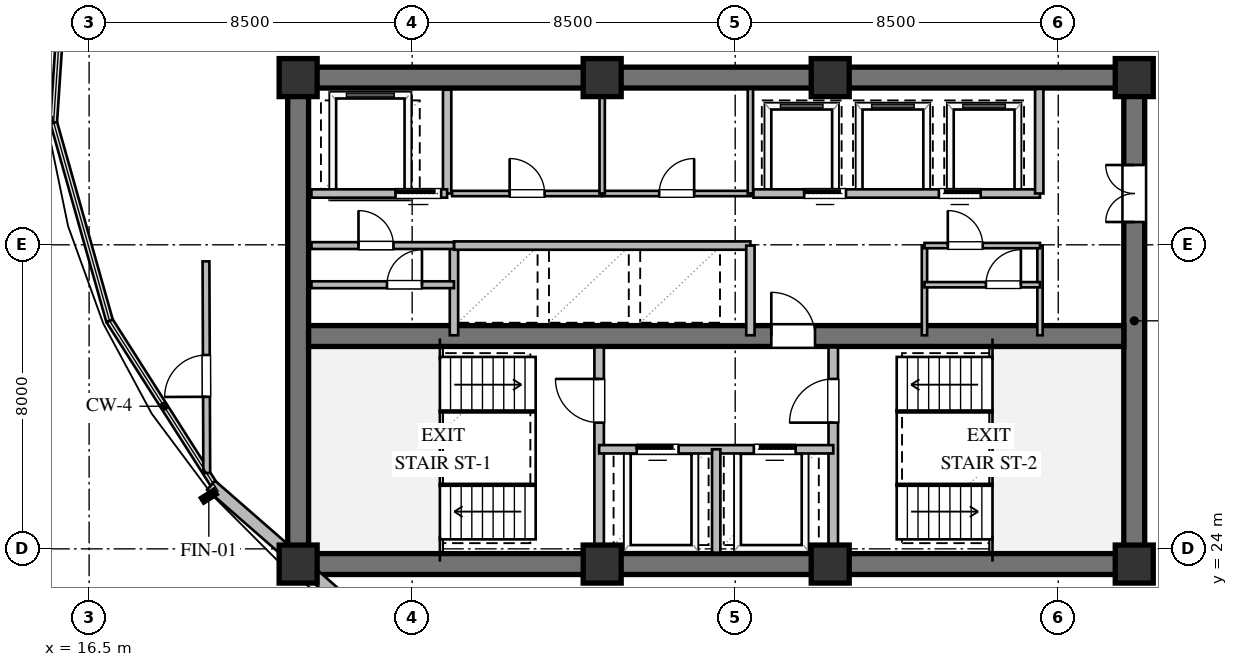
"""IFC4 building model, lengths in metres.
Left out: names, types, materials, properties, quantities, classifications, styles, units other than length and angle.
Written with IfcOpenShell. Run it as: python <this file> out.ifc"""

import sys

from ifc_helpers import new_model, si_unit, direction, frame, frame_2d, origin, origin_2d, place, context, subcontext, project, spatial, rectangle, extrude, element, fill, save


model = new_model("IFC4")
c1 = context("Model", 3, precision=1e-05, world=origin(), true_north=direction((0.0, 1.0)))
c2 = subcontext(c1, "Body", "Model", "MODEL_VIEW")
j1 = project(units=[si_unit("LENGTHUNIT", "METRE"), si_unit("PLANEANGLEUNIT", "RADIAN")], contexts=[c1])
p1 = place(None, origin())
s1 = spatial("IfcSite", under=j1, at=p1, CompositionType="ELEMENT")
p2 = place(p1, origin())
s2 = spatial("IfcBuilding", under=s1, at=p2, CompositionType="ELEMENT")
p3 = place(p2, frame((0.0, 0.0, 131.4)))
s3 = spatial("IfcBuildingStorey", under=s2, at=p3, CompositionType="ELEMENT", Elevation=131.4)
for number, where, z_axis, x_axis in (
    (1, (21.725, 23.6, 0.0), (0.0, 0.0, 1.0), (1.0, 0.0, 0.0)),
    (2, (21.725, 36.4, 0.0), (0.0, 0.0, 1.0), (1.0, 0.0, 0.0)),
):
    element("IfcWall", number, at=place(p3, frame(where, z_axis=z_axis, x_axis=x_axis)), inside=s3, PredefinedType="SHEAR", context=c2, shape_type="SweptSolid", body=[
        extrude(rectangle(XDim=22.55, YDim=0.55, at=frame_2d((11.275, 0.0))), origin(), (0.0, 0.0, 1.0), 3.36),
    ])
p4 = place(p3, frame((22.0, 23.875, 0.0), z_axis=(0.0, 0.0, 1.0), x_axis=(0.0, 1.0, 0.0)))
e3 = element("IfcWall", 3, at=p4, inside=s3, PredefinedType="SHEAR", context=c2, shape_type="SweptSolid", body=[
    extrude(rectangle(XDim=12.25, YDim=0.55, at=frame_2d((6.125, 0.0))), origin(), (0.0, 0.0, 1.0), 3.36),
])
p5 = place(p3, frame((44.0, 23.875, 0.0), z_axis=(0.0, 0.0, 1.0), x_axis=(0.0, 1.0, 0.0)))
e4 = element("IfcWall", 4, at=p5, inside=s3, PredefinedType="SHEAR", context=c2, shape_type="SweptSolid", body=[
    extrude(rectangle(XDim=12.25, YDim=0.55, at=frame_2d((6.125, 0.0))), origin(), (0.0, 0.0, 1.0), 3.36),
])
p6 = place(p5, frame((8.725, 0.0, 0.0)))
e5 = element("IfcOpeningElement", 5, at=p6, cuts=e4, PredefinedType="OPENING", context=c2, shape_type="SweptSolid", body=[
    extrude(rectangle(XDim=1.5, YDim=2.15, at=frame_2d((0.75, 1.075))), frame((0.0, 0.285, 0.0), z_axis=(0.0, -1.0, 0.0), x_axis=(1.0, 0.0, 0.0)), (0.0, 0.0, 1.0), 0.57),
])
p7 = place(p3, frame((22.275, 29.6, 0.0), z_axis=(0.0, 0.0, 1.0), x_axis=(1.0, 0.0, 0.0)))
e6 = element("IfcWall", 6, at=p7, inside=s3, PredefinedType="SHEAR", context=c2, shape_type="SweptSolid", body=[
    extrude(rectangle(XDim=21.45, YDim=0.55, at=frame_2d((10.725, 0.0))), origin(), (0.0, 0.0, 1.0), 3.36),
])
p8 = place(p7, frame((12.175, 0.0, 0.0)))
e7 = element("IfcOpeningElement", 7, at=p8, cuts=e6, PredefinedType="OPENING", context=c2, shape_type="SweptSolid", body=[
    extrude(rectangle(XDim=1.15, YDim=2.1, at=frame_2d((0.575, 1.05))), frame((0.0, 0.285, 0.0), z_axis=(0.0, -1.0, 0.0), x_axis=(1.0, 0.0, 0.0)), (0.0, 0.0, 1.0), 0.57),
])
for number, where, z_axis, x_axis in (
    (8, (22.0, 23.6, 0.0), (0.0, 0.0, 1.0), (1.0, 0.0, 0.0)),
    (9, (30.0, 23.6, 0.0), (0.0, 0.0, 1.0), (1.0, 0.0, 0.0)),
    (10, (36.0, 23.6, 0.0), (0.0, 0.0, 1.0), (1.0, 0.0, 0.0)),
    (11, (44.0, 23.6, 0.0), (0.0, 0.0, 1.0), (1.0, 0.0, 0.0)),
    (12, (44.0, 36.4, 0.0), (0.0, 0.0, 1.0), (1.0, 0.0, 0.0)),
    (13, (36.0, 36.4, 0.0), (0.0, 0.0, 1.0), (1.0, 0.0, 0.0)),
    (14, (30.0, 36.4, 0.0), (0.0, 0.0, 1.0), (1.0, 0.0, 0.0)),
    (15, (22.0, 36.4, 0.0), (0.0, 0.0, 1.0), (1.0, 0.0, 0.0)),
):
    element("IfcColumn", number, at=place(p3, frame(where, z_axis=z_axis, x_axis=x_axis)), inside=s3, PredefinedType="COLUMN", context=c2, shape_type="SweptSolid", body=[
        extrude(rectangle(XDim=1.0, YDim=1.0, at=origin_2d()), origin(), (0.0, 0.0, 1.0), 3.6),
    ])
p9 = place(p3, frame((24.225, 21.727, 0.0), z_axis=(0.0, 0.0, 1.0), x_axis=(-0.753105964003, 0.657899237713, 0.0)))
e16 = element("IfcWall", 16, at=p9, inside=s3, PredefinedType="STANDARD", context=c2, shape_type="SweptSolid", body=[
    extrude(rectangle(XDim=5.998, YDim=0.32, at=frame_2d((2.999, 0.0))), origin(), (0.0, 0.0, 1.0), 2.35),
])
p10 = place(p3, frame((29.92, 23.9, 0.0), z_axis=(0.0, 0.0, 1.0), x_axis=(0.0, 1.0, 0.0)))
e17 = element("IfcWall", 17, at=p10, inside=s3, PredefinedType="SOLIDWALL", context=c2, shape_type="SweptSolid", body=[
    extrude(rectangle(XDim=5.4, YDim=0.25, at=frame_2d((2.7, 0.0))), origin(), (0.0, 0.0, 1.0), 2.806),
])
p11 = place(p10, frame((3.421, 0.0, 0.0)))
e18 = element("IfcOpeningElement", 18, at=p11, cuts=e17, PredefinedType="OPENING", context=c2, shape_type="SweptSolid", body=[
    extrude(rectangle(XDim=1.15, YDim=2.1, at=frame_2d((0.575, 1.05))), frame((0.0, 0.135, 0.0), z_axis=(0.0, -1.0, 0.0), x_axis=(1.0, 0.0, 0.0)), (0.0, 0.0, 1.0), 0.27),
])
p12 = place(p3, frame((36.08, 23.9, 0.0), z_axis=(0.0, 0.0, 1.0), x_axis=(0.0, 1.0, 0.0)))
e19 = element("IfcWall", 19, at=p12, inside=s3, PredefinedType="SOLIDWALL", context=c2, shape_type="SweptSolid", body=[
    extrude(rectangle(XDim=5.4, YDim=0.25, at=frame_2d((2.7, 0.0))), origin(), (0.0, 0.0, 1.0), 3.36),
])
p13 = place(p12, frame((3.421, 0.0, 0.0)))
e20 = element("IfcOpeningElement", 20, at=p13, cuts=e19, PredefinedType="OPENING", context=c2, shape_type="SweptSolid", body=[
    extrude(rectangle(XDim=1.15, YDim=2.1, at=frame_2d((0.575, 1.05))), frame((0.0, 0.135, 0.0), z_axis=(0.0, -1.0, 0.0), x_axis=(1.0, 0.0, 0.0)), (0.0, 0.0, 1.0), 0.27),
])
p14 = place(p3, frame((29.92, 26.62, 0.0), z_axis=(0.0, 0.0, 1.0), x_axis=(1.0, 0.0, 0.0)))
e21 = element("IfcWall", 21, at=p14, inside=s3, PredefinedType="SOLIDWALL", context=c2, shape_type="SweptSolid", body=[
    extrude(rectangle(XDim=6.16, YDim=0.22, at=frame_2d((3.08, 0.0))), origin(), (0.0, 0.0, 1.0), 3.36),
])
p15 = place(p14, frame((0.99, 0.0, 0.0)))
e22 = element("IfcOpeningElement", 22, at=p15, cuts=e21, PredefinedType="OPENING", context=c2, shape_type="SweptSolid", body=[
    extrude(rectangle(XDim=1.1, YDim=2.1, at=frame_2d((0.55, 1.05))), frame((0.0, 0.12, 0.0), z_axis=(0.0, -1.0, 0.0), x_axis=(1.0, 0.0, 0.0)), (0.0, 0.0, 1.0), 0.24),
])
p16 = place(p14, frame((4.07, 0.0, 0.0)))
e23 = element("IfcOpeningElement", 23, at=p16, cuts=e21, PredefinedType="OPENING", context=c2, shape_type="SweptSolid", body=[
    extrude(rectangle(XDim=1.1, YDim=2.1, at=frame_2d((0.55, 1.05))), frame((0.0, 0.12, 0.0), z_axis=(0.0, -1.0, 0.0), x_axis=(1.0, 0.0, 0.0)), (0.0, 0.0, 1.0), 0.24),
])
p17 = place(p3, frame((33.0, 23.9, 0.0), z_axis=(0.0, 0.0, 1.0), x_axis=(0.0, 1.0, 0.0)))
e24 = element("IfcWall", 24, at=p17, inside=s3, PredefinedType="SOLIDWALL", context=c2, shape_type="SweptSolid", body=[
    extrude(rectangle(XDim=2.72, YDim=0.22, at=frame_2d((1.36, 0.0))), origin(), (0.0, 0.0, 1.0), 3.36),
])
p18 = place(p3, frame((25.92, 33.35, 0.0), z_axis=(0.0, 0.0, 1.0), x_axis=(0.0, 1.0, 0.0)))
e25 = element("IfcWall", 25, at=p18, inside=s3, PredefinedType="SOLIDWALL", context=c2, shape_type="SweptSolid", body=[
    extrude(rectangle(XDim=2.73, YDim=0.22, at=frame_2d((1.365, 0.0))), origin(), (0.0, 0.0, 1.0), 3.36),
])
p19 = place(p3, frame((22.35, 33.35, 0.0), z_axis=(0.0, 0.0, 1.0), x_axis=(1.0, 0.0, 0.0)))
e26 = element("IfcWall", 26, at=p19, inside=s3, PredefinedType="SOLIDWALL", context=c2, shape_type="SweptSolid", body=[
    extrude(rectangle(XDim=3.57, YDim=0.22, at=frame_2d((1.785, 0.0))), origin(), (0.0, 0.0, 1.0), 3.36),
])
p20 = place(p19, frame((2.213, 0.0, 0.0)))
e27 = element("IfcOpeningElement", 27, at=p20, cuts=e26, PredefinedType="OPENING", context=c2, shape_type="SweptSolid", body=[
    extrude(rectangle(XDim=1.2, YDim=2.1, at=frame_2d((0.6, 1.05))), frame((0.0, 0.12, 0.0), z_axis=(0.0, -1.0, 0.0), x_axis=(1.0, 0.0, 0.0)), (0.0, 0.0, 1.0), 0.24),
])
p21 = place(p3, frame((26.1, 29.62, 0.0), z_axis=(0.0, 0.0, 1.0), x_axis=(0.0, 1.0, 0.0)))
e28 = element("IfcWall", 28, at=p21, inside=s3, PredefinedType="SOLIDWALL", context=c2, shape_type="SweptSolid", body=[
    extrude(rectangle(XDim=2.36, YDim=0.22, at=frame_2d((1.18, 0.0))), origin(), (0.0, 0.0, 1.0), 3.36),
])
p22 = place(p3, frame((26.1, 31.98, 0.0), z_axis=(0.0, 0.0, 1.0), x_axis=(1.0, 0.0, 0.0)))
e29 = element("IfcWall", 29, at=p22, inside=s3, PredefinedType="SOLIDWALL", context=c2, shape_type="SweptSolid", body=[
    extrude(rectangle(XDim=7.8, YDim=0.22, at=frame_2d((3.9, 0.0))), origin(), (0.0, 0.0, 1.0), 3.36),
])
p23 = place(p3, frame((33.9, 29.62, 0.0), z_axis=(0.0, 0.0, 1.0), x_axis=(0.0, 1.0, 0.0)))
e30 = element("IfcWall", 30, at=p23, inside=s3, PredefinedType="SOLIDWALL", context=c2, shape_type="SweptSolid", body=[
    extrude(rectangle(XDim=2.36, YDim=0.22, at=frame_2d((1.18, 0.0))), origin(), (0.0, 0.0, 1.0), 3.36),
])
p24 = place(p3, frame((26.05, 33.35, 0.0), z_axis=(0.0, 0.0, 1.0), x_axis=(1.0, 0.0, 0.0)))
e31 = element("IfcWall", 31, at=p24, inside=s3, PredefinedType="PARTITIONING", context=c2, shape_type="SweptSolid", body=[
    extrude(rectangle(XDim=3.95, YDim=0.14, at=frame_2d((1.975, 0.0))), origin(), (0.0, 0.0, 1.0), 3.36),
])
p25 = place(p24, frame((1.515, 0.0, 0.0)))
e32 = element("IfcOpeningElement", 32, at=p25, cuts=e31, PredefinedType="OPENING", context=c2, shape_type="SweptSolid", body=[
    extrude(rectangle(XDim=0.92, YDim=2.1, at=frame_2d((0.46, 1.05))), frame((0.0, 0.08, 0.0), z_axis=(0.0, -1.0, 0.0), x_axis=(1.0, 0.0, 0.0)), (0.0, 0.0, 1.0), 0.16),
])
p26 = place(p3, frame((30.0, 33.35, 0.0), z_axis=(0.0, 0.0, 1.0), x_axis=(1.0, 0.0, 0.0)))
e33 = element("IfcWall", 33, at=p26, inside=s3, PredefinedType="PARTITIONING", context=c2, shape_type="SweptSolid", body=[
    extrude(rectangle(XDim=3.92, YDim=0.14, at=frame_2d((1.96, 0.0))), origin(), (0.0, 0.0, 1.0), 3.36),
])
p27 = place(p26, frame((1.5, 0.0, 0.0)))
e34 = element("IfcOpeningElement", 34, at=p27, cuts=e33, PredefinedType="OPENING", context=c2, shape_type="SweptSolid", body=[
    extrude(rectangle(XDim=0.92, YDim=2.1, at=frame_2d((0.46, 1.05))), frame((0.0, 0.08, 0.0), z_axis=(0.0, -1.0, 0.0), x_axis=(1.0, 0.0, 0.0)), (0.0, 0.0, 1.0), 0.16),
])
for number, where, z_axis, x_axis in (
    (35, (30.0, 33.35, 0.0), (0.0, 0.0, 1.0), (0.0, 1.0, 0.0)),
    (36, (33.9, 33.35, 0.0), (0.0, 0.0, 1.0), (0.0, 1.0, 0.0)),
):
    element("IfcWall", number, at=place(p3, frame(where, z_axis=z_axis, x_axis=x_axis)), inside=s3, PredefinedType="PARTITIONING", context=c2, shape_type="SweptSolid", body=[
        extrude(rectangle(XDim=2.75, YDim=0.14, at=frame_2d((1.375, 0.0))), origin(), (0.0, 0.0, 1.0), 3.36),
    ])
p28 = place(p3, frame((33.98, 33.35, 0.0), z_axis=(0.0, 0.0, 1.0), x_axis=(1.0, 0.0, 0.0)))
e37 = element("IfcWall", 37, at=p28, inside=s3, PredefinedType="SOLIDWALL", context=c2, shape_type="SweptSolid", body=[
    extrude(rectangle(XDim=7.54, YDim=0.22, at=frame_2d((3.77, 0.0))), origin(), (0.0, 0.0, 1.0), 3.36),
])
p29 = place(p28, frame((1.335, 0.0, 0.0)))
e38 = element("IfcOpeningElement", 38, at=p29, cuts=e37, PredefinedType="OPENING", context=c2, shape_type="SweptSolid", body=[
    extrude(rectangle(XDim=1.1, YDim=2.1, at=frame_2d((0.55, 1.05))), frame((0.0, 0.12, 0.0), z_axis=(0.0, -1.0, 0.0), x_axis=(1.0, 0.0, 0.0)), (0.0, 0.0, 1.0), 0.24),
])
p30 = place(p28, frame((4.879, 0.0, 0.0)))
e39 = element("IfcOpeningElement", 39, at=p30, cuts=e37, PredefinedType="OPENING", context=c2, shape_type="SweptSolid", body=[
    extrude(rectangle(XDim=1.1, YDim=2.1, at=frame_2d((0.55, 1.05))), frame((0.0, 0.12, 0.0), z_axis=(0.0, -1.0, 0.0), x_axis=(1.0, 0.0, 0.0)), (0.0, 0.0, 1.0), 0.24),
])
p31 = place(p3, frame((41.5, 33.35, 0.0), z_axis=(0.0, 0.0, 1.0), x_axis=(0.0, 1.0, 0.0)))
e40 = element("IfcWall", 40, at=p31, inside=s3, PredefinedType="SOLIDWALL", context=c2, shape_type="SweptSolid", body=[
    extrude(rectangle(XDim=2.75, YDim=0.22, at=frame_2d((1.375, 0.0))), origin(), (0.0, 0.0, 1.0), 3.36),
])
p32 = place(p3, frame((22.35, 30.95, 0.0), z_axis=(0.0, 0.0, 1.0), x_axis=(1.0, 0.0, 0.0)))
e41 = element("IfcWall", 41, at=p32, inside=s3, PredefinedType="PARTITIONING", context=c2, shape_type="SweptSolid", body=[
    extrude(rectangle(XDim=3.75, YDim=0.18, at=frame_2d((1.875, 0.0))), origin(), (0.0, 0.0, 1.0), 3.36),
])
p33 = place(p32, frame((1.988, 0.0, 0.0)))
e42 = element("IfcOpeningElement", 42, at=p33, cuts=e41, PredefinedType="OPENING", context=c2, shape_type="SweptSolid", body=[
    extrude(rectangle(XDim=0.92, YDim=2.1, at=frame_2d((0.46, 1.05))), frame((0.0, 0.1, 0.0), z_axis=(0.0, -1.0, 0.0), x_axis=(1.0, 0.0, 0.0)), (0.0, 0.0, 1.0), 0.2),
])
p34 = place(p3, frame((22.35, 31.98, 0.0), z_axis=(0.0, 0.0, 1.0), x_axis=(1.0, 0.0, 0.0)))
e43 = element("IfcWall", 43, at=p34, inside=s3, PredefinedType="PARTITIONING", context=c2, shape_type="SweptSolid", body=[
    extrude(rectangle(XDim=3.75, YDim=0.18, at=frame_2d((1.875, 0.0))), origin(), (0.0, 0.0, 1.0), 3.36),
])
p35 = place(p34, frame((1.238, 0.0, 0.0)))
e44 = element("IfcOpeningElement", 44, at=p35, cuts=e43, PredefinedType="OPENING", context=c2, shape_type="SweptSolid", body=[
    extrude(rectangle(XDim=0.92, YDim=2.1, at=frame_2d((0.46, 1.05))), frame((0.0, 0.1, 0.0), z_axis=(0.0, -1.0, 0.0), x_axis=(1.0, 0.0, 0.0)), (0.0, 0.0, 1.0), 0.2),
])
for number, where, z_axis, x_axis in (
    (45, (38.48, 29.62, 0.0), (0.0, 0.0, 1.0), (0.0, 1.0, 0.0)),
    (46, (41.52, 29.62, 0.0), (0.0, 0.0, 1.0), (0.0, 1.0, 0.0)),
):
    element("IfcWall", number, at=place(p3, frame(where, z_axis=z_axis, x_axis=x_axis)), inside=s3, PredefinedType="PARTITIONING", context=c2, shape_type="SweptSolid", body=[
        extrude(rectangle(XDim=2.36, YDim=0.14, at=frame_2d((1.18, 0.0))), origin(), (0.0, 0.0, 1.0), 3.36),
    ])
p36 = place(p3, frame((38.48, 30.95, 0.0), z_axis=(0.0, 0.0, 1.0), x_axis=(1.0, 0.0, 0.0)))
e47 = element("IfcWall", 47, at=p36, inside=s3, PredefinedType="PARTITIONING", context=c2, shape_type="SweptSolid", body=[
    extrude(rectangle(XDim=3.04, YDim=0.14, at=frame_2d((1.52, 0.0))), origin(), (0.0, 0.0, 1.0), 3.36),
])
p37 = place(p36, frame((1.617, 0.0, 0.0)))
e48 = element("IfcOpeningElement", 48, at=p37, cuts=e47, PredefinedType="OPENING", context=c2, shape_type="SweptSolid", body=[
    extrude(rectangle(XDim=0.92, YDim=2.1, at=frame_2d((0.46, 1.05))), frame((0.0, 0.08, 0.0), z_axis=(0.0, -1.0, 0.0), x_axis=(1.0, 0.0, 0.0)), (0.0, 0.0, 1.0), 0.16),
])
p38 = place(p3, frame((38.48, 31.98, 0.0), z_axis=(0.0, 0.0, 1.0), x_axis=(1.0, 0.0, 0.0)))
e49 = element("IfcWall", 49, at=p38, inside=s3, PredefinedType="PARTITIONING", context=c2, shape_type="SweptSolid", body=[
    extrude(rectangle(XDim=3.04, YDim=0.14, at=frame_2d((1.52, 0.0))), origin(), (0.0, 0.0, 1.0), 3.36),
])
p39 = place(p38, frame((0.614, 0.0, 0.0)))
e50 = element("IfcOpeningElement", 50, at=p39, cuts=e49, PredefinedType="OPENING", context=c2, shape_type="SweptSolid", body=[
    extrude(rectangle(XDim=0.92, YDim=2.1, at=frame_2d((0.46, 1.05))), frame((0.0, 0.08, 0.0), z_axis=(0.0, -1.0, 0.0), x_axis=(1.0, 0.0, 0.0)), (0.0, 0.0, 1.0), 0.16),
])
p40 = place(p3, frame((19.595, 25.997, 0.0), z_axis=(0.0, 0.0, 1.0), x_axis=(-0.003639049913, 0.999993378636, 0.0)))
e51 = element("IfcWall", 51, at=p40, inside=s3, PredefinedType="PARTITIONING", context=c2, shape_type="SweptSolid", body=[
    extrude(rectangle(XDim=5.568, YDim=0.18, at=frame_2d((2.784, 0.0))), origin(), (0.0, 0.0, 1.0), 2.657),
])
p41 = place(p40, frame((2.004, 0.0, 0.0)))
e52 = element("IfcOpeningElement", 52, at=p41, cuts=e51, PredefinedType="OPENING", context=c2, shape_type="SweptSolid", body=[
    extrude(rectangle(XDim=1.1, YDim=2.1, at=frame_2d((0.55, 1.05))), frame((0.0, 0.1, 0.0), z_axis=(0.0, -1.0, 0.0), x_axis=(1.0, 0.0, 0.0)), (0.0, 0.0, 1.0), 0.2),
])
p42 = place(p11, origin())
e53 = element("IfcDoor", 53, at=p42, inside=s3, OperationType="SINGLE_SWING_RIGHT", PredefinedType="DOOR", context=c2, shape_type="SweptSolid", body=[
    extrude(rectangle(XDim=1.15, YDim=2.1, at=frame_2d((0.575, 1.05))), frame((0.0, 0.025, 0.0), z_axis=(0.0, -1.0, 0.0), x_axis=(1.0, 0.0, 0.0)), (0.0, 0.0, 1.0), 0.05),
])
fill(e18, e53)
p43 = place(p13, origin())
e54 = element("IfcDoor", 54, at=p43, inside=s3, OperationType="SINGLE_SWING_LEFT", PredefinedType="DOOR", context=c2, shape_type="SweptSolid", body=[
    extrude(rectangle(XDim=1.15, YDim=2.1, at=frame_2d((0.575, 1.05))), frame((0.0, 0.025, 0.0), z_axis=(0.0, -1.0, 0.0), x_axis=(1.0, 0.0, 0.0)), (0.0, 0.0, 1.0), 0.05),
])
fill(e20, e54)
p44 = place(p15, origin())
e55 = element("IfcDoor", 55, at=p44, inside=s3, OperationType="SLIDING_TO_LEFT", PredefinedType="DOOR", context=c2, shape_type="SweptSolid", body=[
    extrude(rectangle(XDim=1.1, YDim=2.1, at=frame_2d((0.55, 1.05))), frame((0.0, 0.025, 0.0), z_axis=(0.0, -1.0, 0.0), x_axis=(1.0, 0.0, 0.0)), (0.0, 0.0, 1.0), 0.05),
])
fill(e22, e55)
p45 = place(p16, origin())
e56 = element("IfcDoor", 56, at=p45, inside=s3, OperationType="SLIDING_TO_RIGHT", PredefinedType="DOOR", context=c2, shape_type="SweptSolid", body=[
    extrude(rectangle(XDim=1.1, YDim=2.1, at=frame_2d((0.55, 1.05))), frame((0.0, 0.025, 0.0), z_axis=(0.0, -1.0, 0.0), x_axis=(1.0, 0.0, 0.0)), (0.0, 0.0, 1.0), 0.05),
])
fill(e23, e56)
p46 = place(p8, origin())
e57 = element("IfcDoor", 57, at=p46, inside=s3, OperationType="SINGLE_SWING_LEFT", PredefinedType="DOOR", context=c2, shape_type="SweptSolid", body=[
    extrude(rectangle(XDim=1.15, YDim=2.1, at=frame_2d((0.575, 1.05))), frame((0.0, 0.025, 0.0), z_axis=(0.0, -1.0, 0.0), x_axis=(1.0, 0.0, 0.0)), (0.0, 0.0, 1.0), 0.05),
])
fill(e7, e57)
p47 = place(p6, origin())
e58 = element("IfcDoor", 58, at=p47, inside=s3, OperationType="DOUBLE_DOOR_SINGLE_SWING", PredefinedType="DOOR", context=c2, shape_type="SweptSolid", body=[
    extrude(rectangle(XDim=1.5, YDim=2.15, at=frame_2d((0.75, 1.075))), frame((0.0, 0.025, 0.0), z_axis=(0.0, -1.0, 0.0), x_axis=(1.0, 0.0, 0.0)), (0.0, 0.0, 1.0), 0.05),
])
fill(e5, e58)
p48 = place(p20, origin())
e59 = element("IfcDoor", 59, at=p48, inside=s3, OperationType="SLIDING_TO_LEFT", PredefinedType="DOOR", context=c2, shape_type="SweptSolid", body=[
    extrude(rectangle(XDim=1.2, YDim=2.1, at=frame_2d((0.6, 1.05))), frame((0.0, 0.025, 0.0), z_axis=(0.0, -1.0, 0.0), x_axis=(1.0, 0.0, 0.0)), (0.0, 0.0, 1.0), 0.05),
])
fill(e27, e59)
p49 = place(p25, origin())
e60 = element("IfcDoor", 60, at=p49, inside=s3, OperationType="SINGLE_SWING_LEFT", PredefinedType="DOOR", context=c2, shape_type="SweptSolid", body=[
    extrude(rectangle(XDim=0.92, YDim=2.1, at=frame_2d((0.46, 1.05))), frame((0.0, 0.025, 0.0), z_axis=(0.0, -1.0, 0.0), x_axis=(1.0, 0.0, 0.0)), (0.0, 0.0, 1.0), 0.05),
])
fill(e32, e60)
p50 = place(p27, origin())
e61 = element("IfcDoor", 61, at=p50, inside=s3, OperationType="SINGLE_SWING_RIGHT", PredefinedType="DOOR", context=c2, shape_type="SweptSolid", body=[
    extrude(rectangle(XDim=0.92, YDim=2.1, at=frame_2d((0.46, 1.05))), frame((0.0, 0.025, 0.0), z_axis=(0.0, -1.0, 0.0), x_axis=(1.0, 0.0, 0.0)), (0.0, 0.0, 1.0), 0.05),
])
fill(e34, e61)
p51 = place(p29, origin())
e62 = element("IfcDoor", 62, at=p51, inside=s3, OperationType="SLIDING_TO_LEFT", PredefinedType="DOOR", context=c2, shape_type="SweptSolid", body=[
    extrude(rectangle(XDim=1.1, YDim=2.1, at=frame_2d((0.55, 1.05))), frame((0.0, 0.025, 0.0), z_axis=(0.0, -1.0, 0.0), x_axis=(1.0, 0.0, 0.0)), (0.0, 0.0, 1.0), 0.05),
])
fill(e38, e62)
p52 = place(p30, origin())
e63 = element("IfcDoor", 63, at=p52, inside=s3, OperationType="SLIDING_TO_RIGHT", PredefinedType="DOOR", context=c2, shape_type="SweptSolid", body=[
    extrude(rectangle(XDim=1.1, YDim=2.1, at=frame_2d((0.55, 1.05))), frame((0.0, 0.025, 0.0), z_axis=(0.0, -1.0, 0.0), x_axis=(1.0, 0.0, 0.0)), (0.0, 0.0, 1.0), 0.05),
])
fill(e39, e63)
p53 = place(p35, origin())
e64 = element("IfcDoor", 64, at=p53, inside=s3, OperationType="SINGLE_SWING_LEFT", PredefinedType="DOOR", context=c2, shape_type="SweptSolid", body=[
    extrude(rectangle(XDim=0.92, YDim=2.1, at=frame_2d((0.46, 1.05))), frame((0.0, 0.025, 0.0), z_axis=(0.0, -1.0, 0.0), x_axis=(1.0, 0.0, 0.0)), (0.0, 0.0, 1.0), 0.05),
])
fill(e44, e64)
p54 = place(p33, origin())
e65 = element("IfcDoor", 65, at=p54, inside=s3, OperationType="SINGLE_SWING_RIGHT", PredefinedType="DOOR", context=c2, shape_type="SweptSolid", body=[
    extrude(rectangle(XDim=0.92, YDim=2.1, at=frame_2d((0.46, 1.05))), frame((0.0, 0.025, 0.0), z_axis=(0.0, -1.0, 0.0), x_axis=(1.0, 0.0, 0.0)), (0.0, 0.0, 1.0), 0.05),
])
fill(e42, e65)
p55 = place(p39, origin())
e66 = element("IfcDoor", 66, at=p55, inside=s3, OperationType="SINGLE_SWING_LEFT", PredefinedType="DOOR", context=c2, shape_type="SweptSolid", body=[
    extrude(rectangle(XDim=0.92, YDim=2.1, at=frame_2d((0.46, 1.05))), frame((0.0, 0.025, 0.0), z_axis=(0.0, -1.0, 0.0), x_axis=(1.0, 0.0, 0.0)), (0.0, 0.0, 1.0), 0.05),
])
fill(e50, e66)
p56 = place(p37, origin())
e67 = element("IfcDoor", 67, at=p56, inside=s3, OperationType="SINGLE_SWING_RIGHT", PredefinedType="DOOR", context=c2, shape_type="SweptSolid", body=[
    extrude(rectangle(XDim=0.92, YDim=2.1, at=frame_2d((0.46, 1.05))), frame((0.0, 0.025, 0.0), z_axis=(0.0, -1.0, 0.0), x_axis=(1.0, 0.0, 0.0)), (0.0, 0.0, 1.0), 0.05),
])
fill(e48, e67)
p57 = place(p41, origin())
e68 = element("IfcDoor", 68, at=p57, inside=s3, OperationType="SINGLE_SWING_LEFT", PredefinedType="DOOR", context=c2, shape_type="SweptSolid", body=[
    extrude(rectangle(XDim=1.1, YDim=2.1, at=frame_2d((0.55, 1.05))), frame((0.0, 0.025, 0.0), z_axis=(0.0, -1.0, 0.0), x_axis=(1.0, 0.0, 0.0)), (0.0, 0.0, 1.0), 0.05),
])
fill(e52, e68)
save(model, sys.argv[1])
